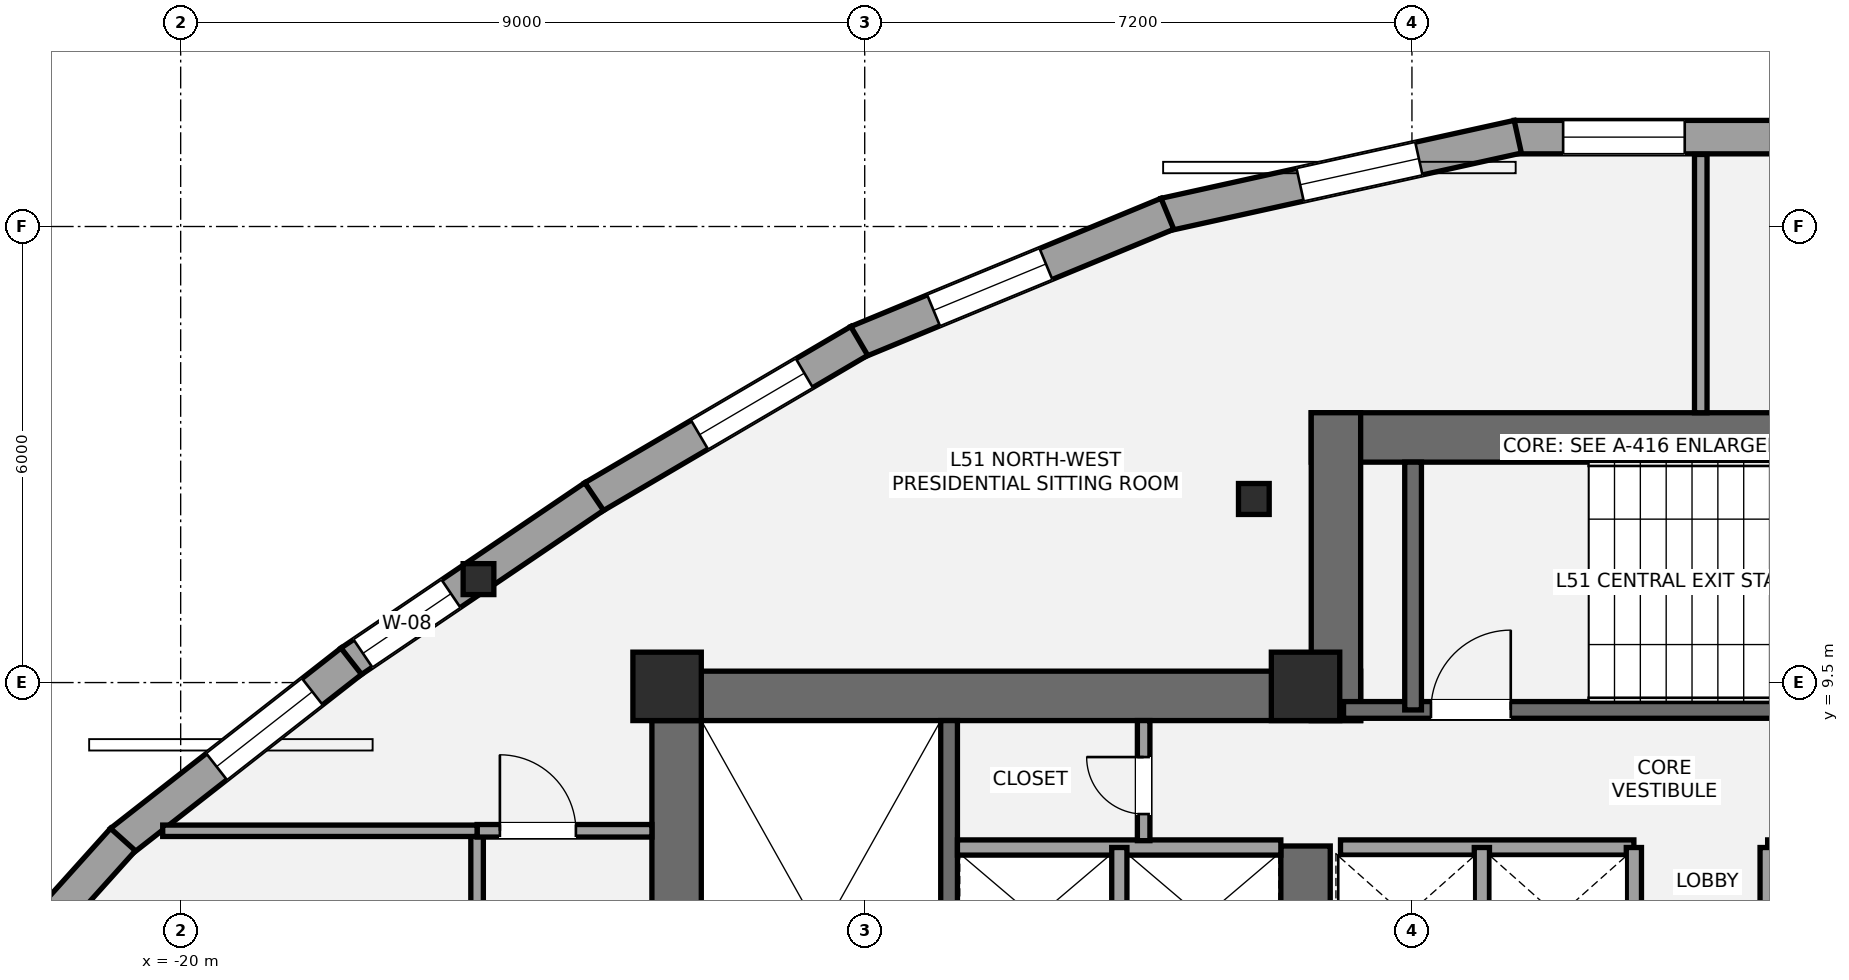
"""IFC4 building model, lengths in metres.
Left out: names, types, materials, properties, quantities, classifications, styles, units other than length and angle.
Written with IfcOpenShell. Run it as: python <this file> out.ifc"""

import sys

from ifc_helpers import new_model, si_unit, direction, frame, frame_2d, origin, origin_2d, place, context, subcontext, project, spatial, rectangle, i_section, extrude, element, fill, save


model = new_model("IFC4")
c1 = context("Model", 3, precision=1e-05, world=origin(), true_north=direction((0.0, 1.0)))
c2 = subcontext(c1, "Body", "Model", "MODEL_VIEW")
j1 = project(units=[si_unit("LENGTHUNIT", "METRE"), si_unit("PLANEANGLEUNIT", "RADIAN")], contexts=[c1])
p1 = place(None, origin())
s1 = spatial("IfcSite", under=j1, at=p1, CompositionType="ELEMENT")
p2 = place(p1, origin())
s2 = spatial("IfcBuilding", under=s1, at=p2, CompositionType="ELEMENT")
p3 = place(p2, frame((0.0, 0.0, 185.4)))
s3 = spatial("IfcBuildingStorey", under=s2, at=p3, CompositionType="ELEMENT", Elevation=185.4)
p4 = place(p3, frame((-13.475, 1.2, 0.0), z_axis=(0.0, 0.0, 1.0), x_axis=(0.0, 1.0, 0.0)))
e1 = element("IfcWall", 1, at=p4, inside=s3, PredefinedType="SHEAR", context=c2, shape_type="SweptSolid", body=[
    extrude(rectangle(XDim=8.45, YDim=0.65, at=frame_2d((4.225, 0.0))), origin(), (0.0, 0.0, 1.0), 3.2),
])
p5 = place(p3, frame((-13.8, 9.325, 0.0), z_axis=(0.0, 0.0, 1.0), x_axis=(1.0, 0.0, 0.0)))
e2 = element("IfcWall", 2, at=p5, inside=s3, PredefinedType="SHEAR", context=c2, shape_type="SweptSolid", body=[
    extrude(rectangle(XDim=9.325, YDim=0.65, at=frame_2d((4.663, 0.0))), origin(), (0.0, 0.0, 1.0), 3.2),
])
p6 = place(p3, frame((-5.2, 5.35, 0.0), z_axis=(0.0, 0.0, 1.0), x_axis=(0.0, 1.0, 0.0)))
e3 = element("IfcWall", 3, at=p6, inside=s3, PredefinedType="SHEAR", context=c2, shape_type="SweptSolid", body=[
    extrude(rectangle(XDim=2.0, YDim=0.65, at=frame_2d((1.0, 0.0))), origin(), (0.0, 0.0, 1.0), 3.2),
])
p7 = place(p3, frame((-9.89, 1.85, 0.0), z_axis=(0.0, 0.0, 1.0), x_axis=(0.0, 1.0, 0.0)))
e4 = element("IfcWall", 4, at=p7, inside=s3, PredefinedType="SHEAR", context=c2, shape_type="SweptSolid", body=[
    extrude(rectangle(XDim=7.15, YDim=0.22, at=frame_2d((3.575, 0.0))), origin(), (0.0, 0.0, 1.0), 3.2),
])
p8 = place(p3, frame((-5.125, 12.725, 0.0), z_axis=(0.0, 0.0, 1.0), x_axis=(1.0, 0.0, 0.0)))
e5 = element("IfcWall", 5, at=p8, inside=s3, PredefinedType="SHEAR", context=c2, shape_type="SweptSolid", body=[
    extrude(rectangle(XDim=10.25, YDim=0.65, at=frame_2d((5.125, 0.0))), origin(), (0.0, 0.0, 1.0), 3.2),
])
p9 = place(p3, frame((-4.8, 9.0, 0.0), z_axis=(0.0, 0.0, 1.0), x_axis=(0.0, 1.0, 0.0)))
e6 = element("IfcWall", 6, at=p9, inside=s3, PredefinedType="SHEAR", context=c2, shape_type="SweptSolid", body=[
    extrude(rectangle(XDim=4.05, YDim=0.65, at=frame_2d((2.025, 0.0))), origin(), (0.0, 0.0, 1.0), 3.2),
])
p10 = place(p3, frame((-4.7, 9.14, 0.0), z_axis=(0.0, 0.0, 1.0), x_axis=(1.0, 0.0, 0.0)))
e7 = element("IfcWall", 7, at=p10, inside=s3, PredefinedType="SHEAR", context=c2, shape_type="SweptSolid", body=[
    extrude(rectangle(XDim=9.3, YDim=0.22, at=frame_2d((4.65, 0.0))), origin(), (0.0, 0.0, 1.0), 3.2),
])
p11 = place(p10, frame((1.15, 0.0, 0.0)))
e8 = element("IfcOpeningElement", 8, at=p11, cuts=e7, PredefinedType="OPENING", context=c2, shape_type="SweptSolid", body=[
    extrude(rectangle(XDim=1.05, YDim=2.15, at=frame_2d((0.525, 1.075))), frame((0.0, 0.12, 0.0), z_axis=(0.0, -1.0, 0.0), x_axis=(1.0, 0.0, 0.0)), (0.0, 0.0, 1.0), 0.24),
])
p12 = place(p3, frame((-3.785, 9.14, 0.0), z_axis=(0.0, 0.0, 1.0), x_axis=(0.0, 1.0, 0.0)))
e9 = element("IfcWall", 9, at=p12, inside=s3, PredefinedType="SHEAR", context=c2, shape_type="SweptSolid", body=[
    extrude(rectangle(XDim=3.26, YDim=0.22, at=frame_2d((1.63, 0.0))), origin(), (0.0, 0.0, 1.0), 3.2),
])
for number, where, z_axis, x_axis in (
    (10, (-13.6, 9.45, 0.0), (0.0, 0.0, 1.0), (1.0, 0.0, 0.0)),
    (11, (-5.2, 9.45, 0.0), (0.0, 0.0, 1.0), (1.0, 0.0, 0.0)),
):
    element("IfcColumn", number, at=place(p3, frame(where, z_axis=z_axis, x_axis=x_axis)), inside=s3, PredefinedType="COLUMN", context=c2, shape_type="SweptSolid", body=[
        extrude(rectangle(XDim=0.9, YDim=0.9, at=origin_2d()), origin(), (0.0, 0.0, 1.0), 3.2),
    ])
for number, where, z_axis, x_axis in (
    (12, (-5.88, 11.915, 0.0), (0.0, 0.0, 1.0), (1.0, 0.0, 0.0)),
    (13, (-16.082, 10.861, 0.0), (0.0, 0.0, 1.0), (1.0, 0.0, 0.0)),
):
    element("IfcColumn", number, at=place(p3, frame(where, z_axis=z_axis, x_axis=x_axis)), inside=s3, PredefinedType="COLUMN", context=c2, shape_type="SweptSolid", body=[
        extrude(i_section(OverallWidth=0.404, OverallDepth=0.407, WebThickness=0.027, FlangeThickness=0.044, at=origin_2d()), origin(), (0.0, 0.0, 1.0), 3.2),
    ])
p13 = place(p3, frame((-2.455, 16.676, 0.0), z_axis=(0.0, 0.0, 1.0), x_axis=(1.0, 0.0, 0.0)))
e14 = element("IfcWall", 14, at=p13, inside=s3, PredefinedType="STANDARD", context=c2, shape_type="SweptSolid", body=[
    extrude(rectangle(XDim=4.909, YDim=0.44, at=frame_2d((2.455, 0.0))), origin(), (0.0, 0.0, 1.0), 2.315),
])
p14 = place(p13, frame((0.644, 0.0, 0.58)))
e15 = element("IfcOpeningElement", 15, at=p14, cuts=e14, PredefinedType="OPENING", context=c2, shape_type="SweptSolid", body=[
    extrude(rectangle(XDim=1.6, YDim=1.55, at=frame_2d((0.8, 0.775))), frame((0.0, 0.23, 0.0), z_axis=(0.0, -1.0, 0.0), x_axis=(1.0, 0.0, 0.0)), (0.0, 0.0, 1.0), 0.46),
])
p15 = place(p3, frame((-7.054, 15.656, 0.0), z_axis=(0.0, 0.0, 1.0), x_axis=(0.976520281828, 0.215425484049, 0.0)))
e16 = element("IfcWall", 16, at=p15, inside=s3, PredefinedType="STANDARD", context=c2, shape_type="SweptSolid", body=[
    extrude(rectangle(XDim=4.759, YDim=0.44, at=frame_2d((2.379, 0.0))), origin(), (0.0, 0.0, 1.0), 2.315),
])
p16 = place(p15, frame((1.826, 0.0, 0.58)))
e17 = element("IfcOpeningElement", 17, at=p16, cuts=e16, PredefinedType="OPENING", context=c2, shape_type="SweptSolid", body=[
    extrude(rectangle(XDim=1.6, YDim=1.55, at=frame_2d((0.8, 0.775))), frame((0.0, 0.23, 0.0), z_axis=(0.0, -1.0, 0.0), x_axis=(1.0, 0.0, 0.0)), (0.0, 0.0, 1.0), 0.46),
])
p17 = place(p3, frame((-11.1, 13.981, 0.0), z_axis=(0.0, 0.0, 1.0), x_axis=(0.924224109839, 0.381850487486, 0.0)))
e18 = element("IfcWall", 18, at=p17, inside=s3, PredefinedType="STANDARD", context=c2, shape_type="SweptSolid", body=[
    extrude(rectangle(XDim=4.417, YDim=0.44, at=frame_2d((2.208, 0.0))), origin(), (0.0, 0.0, 1.0), 2.315),
])
p18 = place(p17, frame((1.088, 0.0, 0.58)))
e19 = element("IfcOpeningElement", 19, at=p18, cuts=e18, PredefinedType="OPENING", context=c2, shape_type="SweptSolid", body=[
    extrude(rectangle(XDim=1.6, YDim=1.55, at=frame_2d((0.8, 0.775))), frame((0.0, 0.23, 0.0), z_axis=(0.0, -1.0, 0.0), x_axis=(1.0, 0.0, 0.0)), (0.0, 0.0, 1.0), 0.46),
])
p19 = place(p3, frame((-14.572, 11.939, 0.0), z_axis=(0.0, 0.0, 1.0), x_axis=(0.862269598443, 0.506449542995, 0.0)))
e20 = element("IfcWall", 20, at=p19, inside=s3, PredefinedType="STANDARD", context=c2, shape_type="SweptSolid", body=[
    extrude(rectangle(XDim=4.059, YDim=0.44, at=frame_2d((2.029, 0.0))), origin(), (0.0, 0.0, 1.0), 2.315),
])
p20 = place(p19, frame((1.621, 0.0, 0.58)))
e21 = element("IfcOpeningElement", 21, at=p20, cuts=e20, PredefinedType="OPENING", context=c2, shape_type="SweptSolid", body=[
    extrude(rectangle(XDim=1.6, YDim=1.55, at=frame_2d((0.8, 0.775))), frame((0.0, 0.23, 0.0), z_axis=(0.0, -1.0, 0.0), x_axis=(1.0, 0.0, 0.0)), (0.0, 0.0, 1.0), 0.46),
])
p21 = place(p3, frame((-17.768, 9.772, 0.0), z_axis=(0.0, 0.0, 1.0), x_axis=(0.82774221662, 0.561108565988, 0.0)))
e22 = element("IfcWall", 22, at=p21, inside=s3, PredefinedType="STANDARD", context=c2, shape_type="SweptSolid", body=[
    extrude(rectangle(XDim=3.876, YDim=0.44, at=frame_2d((1.938, 0.0))), origin(), (0.0, 0.0, 1.0), 2.315),
])
p22 = place(p21, frame((0.2, 0.0, 0.58)))
e23 = element("IfcOpeningElement", 23, at=p22, cuts=e22, PredefinedType="OPENING", context=c2, shape_type="SweptSolid", body=[
    extrude(rectangle(XDim=1.4, YDim=1.55, at=frame_2d((0.7, 0.775))), frame((0.0, 0.23, 0.0), z_axis=(0.0, -1.0, 0.0), x_axis=(1.0, 0.0, 0.0)), (0.0, 0.0, 1.0), 0.46),
])
p23 = place(p3, frame((-20.787, 7.408, 0.0), z_axis=(0.0, 0.0, 1.0), x_axis=(0.787518383176, 0.616291161838, 0.0)))
e24 = element("IfcWall", 24, at=p23, inside=s3, PredefinedType="STANDARD", context=c2, shape_type="SweptSolid", body=[
    extrude(rectangle(XDim=3.85, YDim=0.44, at=frame_2d((1.925, 0.0))), origin(), (0.0, 0.0, 1.0), 2.315),
])
p24 = place(p23, frame((1.6, 0.0, 0.58)))
e25 = element("IfcOpeningElement", 25, at=p24, cuts=e24, PredefinedType="OPENING", context=c2, shape_type="SweptSolid", body=[
    extrude(rectangle(XDim=1.6, YDim=1.55, at=frame_2d((0.8, 0.775))), frame((0.0, 0.23, 0.0), z_axis=(0.0, -1.0, 0.0), x_axis=(1.0, 0.0, 0.0)), (0.0, 0.0, 1.0), 0.46),
])
p25 = place(p3, frame((-23.247, 4.667, 0.0), z_axis=(0.0, 0.0, 1.0), x_axis=(0.668547778607, 0.743669192396, 0.0)))
e26 = element("IfcWall", 26, at=p25, inside=s3, PredefinedType="STANDARD", context=c2, shape_type="SweptSolid", body=[
    extrude(rectangle(XDim=3.721, YDim=0.44, at=frame_2d((1.861, 0.0))), origin(), (0.0, 0.0, 1.0), 2.315),
])
p26 = place(p25, frame((0.643, 0.0, 0.58)))
e27 = element("IfcOpeningElement", 27, at=p26, cuts=e26, PredefinedType="OPENING", context=c2, shape_type="SweptSolid", body=[
    extrude(rectangle(XDim=1.6, YDim=1.55, at=frame_2d((0.8, 0.775))), frame((0.0, 0.23, 0.0), z_axis=(0.0, -1.0, 0.0), x_axis=(1.0, 0.0, 0.0)), (0.0, 0.0, 1.0), 0.46),
])
p27 = place(p3, frame((-9.78, 7.33, 0.0), z_axis=(0.0, 0.0, 1.0), x_axis=(1.0, 0.0, 0.0)))
e28 = element("IfcWall", 28, at=p27, inside=s3, PredefinedType="SOLIDWALL", context=c2, shape_type="SweptSolid", body=[
    extrude(rectangle(XDim=4.255, YDim=0.2, at=frame_2d((2.127, 0.0))), origin(), (0.0, 0.0, 1.0), 3.02),
])
p28 = place(p3, frame((-7.65, 5.47, 0.0), z_axis=(0.0, 0.0, 1.0), x_axis=(0.0, 1.0, 0.0)))
e29 = element("IfcWall", 29, at=p28, inside=s3, PredefinedType="SOLIDWALL", context=c2, shape_type="SweptSolid", body=[
    extrude(rectangle(XDim=1.86, YDim=0.2, at=frame_2d((0.93, 0.0))), origin(), (0.0, 0.0, 1.0), 3.02),
])
for number, where, z_axis, x_axis in (
    (30, (-4.74, 7.33, 0.0), (0.0, 0.0, 1.0), (1.0, 0.0, 0.0)),
    (31, (0.88, 7.33, 0.0), (0.0, 0.0, 1.0), (1.0, 0.0, 0.0)),
):
    element("IfcWall", number, at=place(p3, frame(where, z_axis=z_axis, x_axis=x_axis)), inside=s3, PredefinedType="SOLIDWALL", context=c2, shape_type="SweptSolid", body=[
        extrude(rectangle(XDim=3.86, YDim=0.2, at=frame_2d((1.93, 0.0))), origin(), (0.0, 0.0, 1.0), 3.02),
    ])
for number, where, z_axis, x_axis in (
    (32, (-2.88, 5.52, 0.0), (0.0, 0.0, 1.0), (0.0, 1.0, 0.0)),
    (33, (-0.88, 5.52, 0.0), (0.0, 0.0, 1.0), (0.0, 1.0, 0.0)),
    (34, (0.88, 5.52, 0.0), (0.0, 0.0, 1.0), (0.0, 1.0, 0.0)),
):
    element("IfcWall", number, at=place(p3, frame(where, z_axis=z_axis, x_axis=x_axis)), inside=s3, PredefinedType="SOLIDWALL", context=c2, shape_type="SweptSolid", body=[
        extrude(rectangle(XDim=1.81, YDim=0.2, at=frame_2d((0.905, 0.0))), origin(), (0.0, 0.0, 1.0), 3.02),
    ])
p29 = place(p3, frame((-7.33, 7.42, 0.0), z_axis=(0.0, 0.0, 1.0), x_axis=(0.0, 1.0, 0.0)))
e35 = element("IfcWall", 35, at=p29, inside=s3, PredefinedType="PARTITIONING", context=c2, shape_type="SweptSolid", body=[
    extrude(rectangle(XDim=1.58, YDim=0.165, at=frame_2d((0.79, 0.0))), origin(), (0.0, 0.0, 1.0), 3.02),
])
p30 = place(p29, frame((0.35, 0.0, 0.0)))
e36 = element("IfcOpeningElement", 36, at=p30, cuts=e35, PredefinedType="OPENING", context=c2, shape_type="SweptSolid", body=[
    extrude(rectangle(XDim=0.75, YDim=2.1, at=frame_2d((0.375, 1.05))), frame((0.0, 0.093, 0.0), z_axis=(0.0, -1.0, 0.0), x_axis=(1.0, 0.0, 0.0)), (0.0, 0.0, 1.0), 0.185),
])
p31 = place(p3, frame((-16.1, -10.627, 0.0), z_axis=(0.0, 0.0, 1.0), x_axis=(0.0, 1.0, 0.0)))
e37 = element("IfcWall", 37, at=p31, inside=s3, PredefinedType="PARTITIONING", context=c2, shape_type="SweptSolid", body=[
    extrude(rectangle(XDim=18.177, YDim=0.165, at=frame_2d((9.088, 0.0))), origin(), (0.0, 0.0, 1.0), 2.473),
])
p32 = place(p31, frame((3.627, 0.0, 0.0)))
e38 = element("IfcOpeningElement", 38, at=p32, cuts=e37, PredefinedType="OPENING", context=c2, shape_type="SweptSolid", body=[
    extrude(rectangle(XDim=0.85, YDim=2.1, at=frame_2d((0.425, 1.05))), frame((0.0, 0.093, 0.0), z_axis=(0.0, -1.0, 0.0), x_axis=(1.0, 0.0, 0.0)), (0.0, 0.0, 1.0), 0.185),
])
p33 = place(p31, frame((6.802, 0.0, 0.0)))
e39 = element("IfcOpeningElement", 39, at=p33, cuts=e37, PredefinedType="OPENING", context=c2, shape_type="SweptSolid", body=[
    extrude(rectangle(XDim=1.0, YDim=2.15, at=frame_2d((0.5, 1.075))), frame((0.0, 0.093, 0.0), z_axis=(0.0, -1.0, 0.0), x_axis=(1.0, 0.0, 0.0)), (0.0, 0.0, 1.0), 0.185),
])
p34 = place(p31, frame((11.227, 0.0, 0.0)))
e40 = element("IfcOpeningElement", 40, at=p34, cuts=e37, PredefinedType="OPENING", context=c2, shape_type="SweptSolid", body=[
    extrude(rectangle(XDim=1.0, YDim=2.15, at=frame_2d((0.5, 1.075))), frame((0.0, 0.093, 0.0), z_axis=(0.0, -1.0, 0.0), x_axis=(1.0, 0.0, 0.0)), (0.0, 0.0, 1.0), 0.185),
])
p35 = place(p31, frame((15.502, 0.0, 0.0)))
e41 = element("IfcOpeningElement", 41, at=p35, cuts=e37, PredefinedType="OPENING", context=c2, shape_type="SweptSolid", body=[
    extrude(rectangle(XDim=1.0, YDim=2.15, at=frame_2d((0.5, 1.075))), frame((0.0, 0.093, 0.0), z_axis=(0.0, -1.0, 0.0), x_axis=(1.0, 0.0, 0.0)), (0.0, 0.0, 1.0), 0.185),
])
p36 = place(p3, frame((-16.1, 7.55, 0.0), z_axis=(0.0, 0.0, 1.0), x_axis=(1.0, 0.0, 0.0)))
e42 = element("IfcWall", 42, at=p36, inside=s3, PredefinedType="PARTITIONING", context=c2, shape_type="SweptSolid", body=[
    extrude(rectangle(XDim=2.3, YDim=0.165, at=frame_2d((1.15, 0.0))), origin(), (0.0, 0.0, 1.0), 2.473),
])
p37 = place(p36, frame((0.3, 0.0, 0.0)))
e43 = element("IfcOpeningElement", 43, at=p37, cuts=e42, PredefinedType="OPENING", context=c2, shape_type="SweptSolid", body=[
    extrude(rectangle(XDim=1.0, YDim=2.15, at=frame_2d((0.5, 1.075))), frame((0.0, 0.093, 0.0), z_axis=(0.0, -1.0, 0.0), x_axis=(1.0, 0.0, 0.0)), (0.0, 0.0, 1.0), 0.185),
])
p38 = place(p3, frame((-20.236, 7.55, 0.0), z_axis=(0.0, 0.0, 1.0), x_axis=(1.0, 0.0, 0.0)))
e44 = element("IfcWall", 44, at=p38, inside=s3, PredefinedType="PLUMBINGWALL", context=c2, shape_type="SweptSolid", body=[
    extrude(rectangle(XDim=4.136, YDim=0.15, at=frame_2d((2.068, 0.0))), origin(), (0.0, 0.0, 1.0), 2.473),
])
p39 = place(p3, frame((0.0, 13.05, 0.0), z_axis=(0.0, 0.0, 1.0), x_axis=(0.0, 1.0, 0.0)))
e45 = element("IfcWall", 45, at=p39, inside=s3, PredefinedType="PARTITIONING", context=c2, shape_type="SweptSolid", body=[
    extrude(rectangle(XDim=3.398, YDim=0.165, at=frame_2d((1.699, 0.0))), origin(), (0.0, 0.0, 1.0), 3.02),
])
p40 = place(p14, origin())
e46 = element("IfcWindow", 46, at=p40, inside=s3, PartitioningType="SINGLE_PANEL", PredefinedType="WINDOW", context=c2, shape_type="SweptSolid", body=[
    extrude(rectangle(XDim=1.6, YDim=1.55, at=frame_2d((0.8, 0.775))), frame((0.0, -0.01, 0.0), z_axis=(0.0, -1.0, 0.0), x_axis=(1.0, 0.0, 0.0)), (0.0, 0.0, 1.0), 0.06),
])
fill(e15, e46)
p41 = place(p16, origin())
e47 = element("IfcWindow", 47, at=p41, inside=s3, PartitioningType="SINGLE_PANEL", PredefinedType="WINDOW", context=c2, shape_type="SweptSolid", body=[
    extrude(rectangle(XDim=1.6, YDim=1.55, at=frame_2d((0.8, 0.775))), frame((0.0, -0.01, 0.0), z_axis=(0.0, -1.0, 0.0), x_axis=(1.0, 0.0, 0.0)), (0.0, 0.0, 1.0), 0.06),
])
fill(e17, e47)
p42 = place(p18, origin())
e48 = element("IfcWindow", 48, at=p42, inside=s3, PartitioningType="SINGLE_PANEL", PredefinedType="WINDOW", context=c2, shape_type="SweptSolid", body=[
    extrude(rectangle(XDim=1.6, YDim=1.55, at=frame_2d((0.8, 0.775))), frame((0.0, -0.01, 0.0), z_axis=(0.0, -1.0, 0.0), x_axis=(1.0, 0.0, 0.0)), (0.0, 0.0, 1.0), 0.06),
])
fill(e19, e48)
p43 = place(p20, origin())
e49 = element("IfcWindow", 49, at=p43, inside=s3, PartitioningType="SINGLE_PANEL", PredefinedType="WINDOW", context=c2, shape_type="SweptSolid", body=[
    extrude(rectangle(XDim=1.6, YDim=1.55, at=frame_2d((0.8, 0.775))), frame((0.0, -0.01, 0.0), z_axis=(0.0, -1.0, 0.0), x_axis=(1.0, 0.0, 0.0)), (0.0, 0.0, 1.0), 0.06),
])
fill(e21, e49)
p44 = place(p22, origin())
e50 = element("IfcWindow", 50, at=p44, inside=s3, PartitioningType="SINGLE_PANEL", PredefinedType="WINDOW", context=c2, shape_type="SweptSolid", body=[
    extrude(rectangle(XDim=1.4, YDim=1.55, at=frame_2d((0.7, 0.775))), frame((0.0, -0.01, 0.0), z_axis=(0.0, -1.0, 0.0), x_axis=(1.0, 0.0, 0.0)), (0.0, 0.0, 1.0), 0.06),
])
fill(e23, e50)
p45 = place(p24, origin())
e51 = element("IfcWindow", 51, at=p45, inside=s3, PartitioningType="SINGLE_PANEL", PredefinedType="WINDOW", context=c2, shape_type="SweptSolid", body=[
    extrude(rectangle(XDim=1.6, YDim=1.55, at=frame_2d((0.8, 0.775))), frame((0.0, -0.01, 0.0), z_axis=(0.0, -1.0, 0.0), x_axis=(1.0, 0.0, 0.0)), (0.0, 0.0, 1.0), 0.06),
])
fill(e25, e51)
p46 = place(p11, origin())
e52 = element("IfcDoor", 52, at=p46, inside=s3, OperationType="SINGLE_SWING_RIGHT", PredefinedType="DOOR", context=c2, shape_type="SweptSolid", body=[
    extrude(rectangle(XDim=1.05, YDim=2.15, at=frame_2d((0.525, 1.075))), frame((0.0, 0.025, 0.0), z_axis=(0.0, -1.0, 0.0), x_axis=(1.0, 0.0, 0.0)), (0.0, 0.0, 1.0), 0.05),
])
fill(e8, e52)
p47 = place(p30, origin())
e53 = element("IfcDoor", 53, at=p47, inside=s3, OperationType="SINGLE_SWING_RIGHT", PredefinedType="DOOR", context=c2, shape_type="SweptSolid", body=[
    extrude(rectangle(XDim=0.75, YDim=2.1, at=frame_2d((0.375, 1.05))), frame((0.0, 0.025, 0.0), z_axis=(0.0, -1.0, 0.0), x_axis=(1.0, 0.0, 0.0)), (0.0, 0.0, 1.0), 0.05),
])
fill(e36, e53)
p48 = place(p37, origin())
e54 = element("IfcDoor", 54, at=p48, inside=s3, OperationType="SINGLE_SWING_LEFT", PredefinedType="DOOR", context=c2, shape_type="SweptSolid", body=[
    extrude(rectangle(XDim=1.0, YDim=2.15, at=frame_2d((0.5, 1.075))), frame((0.0, 0.025, 0.0), z_axis=(0.0, -1.0, 0.0), x_axis=(1.0, 0.0, 0.0)), (0.0, 0.0, 1.0), 0.05),
])
fill(e43, e54)
save(model, sys.argv[1])
